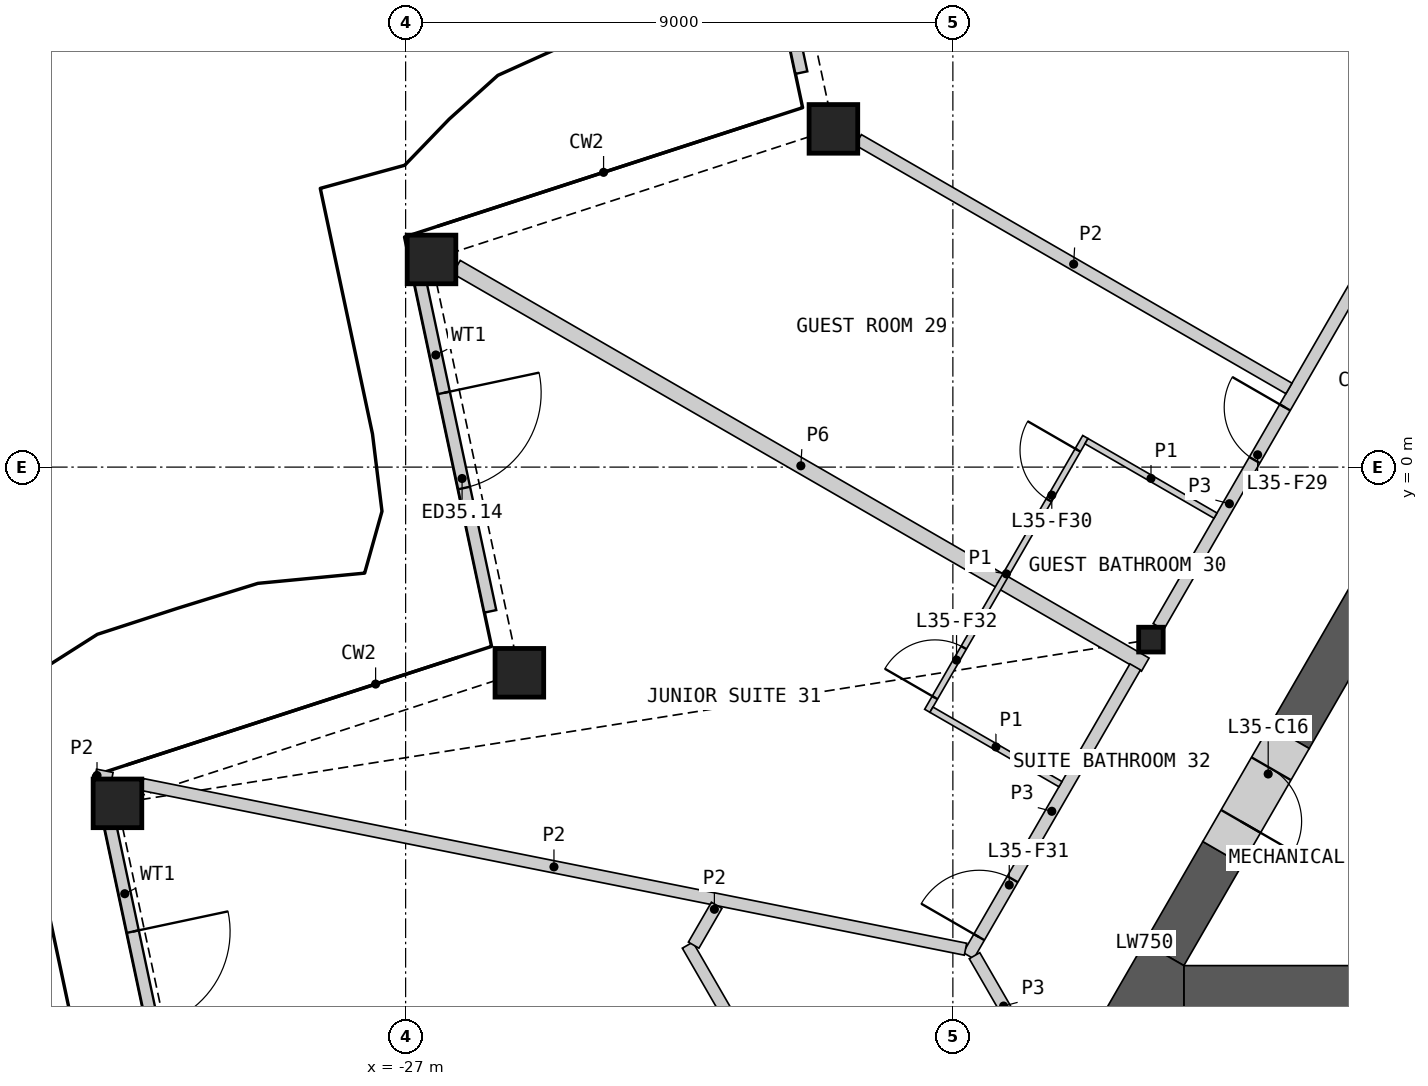
"""IFC4 building model, lengths in metres.
Left out: names, types, materials, properties, quantities, classifications, styles, units other than length and angle.
Written with IfcOpenShell. Run it as: python <this file> out.ifc"""

import sys

from ifc_helpers import new_model, si_unit, direction, frame, frame_2d, origin, origin_2d, place, context, subcontext, project, spatial, polyline, rectangle, hollow_rectangle, i_section, outline, extrude, element, fill, save


model = new_model("IFC4")
c1 = context("Model", 3, precision=1e-05, world=origin(), true_north=direction((0.0, 1.0)))
c2 = subcontext(c1, "Body", "Model", "MODEL_VIEW")
j1 = project(units=[si_unit("LENGTHUNIT", "METRE"), si_unit("PLANEANGLEUNIT", "RADIAN")], contexts=[c1])
p1 = place(None, origin())
s1 = spatial("IfcSite", under=j1, at=p1, CompositionType="ELEMENT")
p2 = place(p1, origin())
s2 = spatial("IfcBuilding", under=s1, at=p2, CompositionType="ELEMENT")
p3 = place(p2, frame((0.0, 0.0, 169.2)))
s3 = spatial("IfcBuildingStorey", under=s2, at=p3, CompositionType="ELEMENT", Elevation=169.2)
for number, where, z_axis, x_axis in (
    (1, (-19.965, 5.563, 0.0), (0.0, 0.0, 1.0), (1.0, 0.0, 0.0)),
    (2, (-26.574, 3.415, 0.0), (0.0, 0.0, 1.0), (1.0, 0.0, 0.0)),
    (3, (-25.129, -3.383, 0.0), (0.0, 0.0, 1.0), (1.0, 0.0, 0.0)),
    (4, (-31.739, -5.53, 0.0), (0.0, 0.0, 1.0), (1.0, 0.0, 0.0)),
):
    element("IfcColumn", number, at=place(p3, frame(where, z_axis=z_axis, x_axis=x_axis)), inside=s3, PredefinedType="COLUMN", context=c2, shape_type="SweptSolid", body=[
        extrude(hollow_rectangle(XDim=0.8, YDim=0.8, WallThickness=0.05, at=origin_2d()), origin(), (0.0, 0.0, 1.0), 3.6),
    ])
p4 = place(p3, frame((-14.743, -2.837, 0.0), z_axis=(0.0, 0.0, 1.0), x_axis=(1.0, 0.0, 0.0)))
e5 = element("IfcColumn", 5, at=p4, inside=s3, PredefinedType="COLUMN", context=c2, shape_type="SweptSolid", body=[
    extrude(i_section(OverallWidth=0.404, OverallDepth=0.407, WebThickness=0.027, FlangeThickness=0.044, at=origin_2d()), origin(), (0.0, 0.0, 1.0), 3.6),
])
p5 = place(p3, frame((-21.686, 12.111, 0.0), z_axis=(0.0, 0.0, 1.0), x_axis=(0.207872471739, -0.978155936184, 0.0)))
e6 = element("IfcWall", 6, at=p5, inside=s3, PredefinedType="SOLIDWALL", context=c2, shape_type="SweptSolid", body=[
    extrude(rectangle(XDim=5.748, YDim=0.2, at=frame_2d((2.874, 0.0))), origin(), (0.0, 0.0, 1.0), 2.701),
])
p6 = place(p5, frame((2.074, 0.0, 0.0)))
e7 = element("IfcOpeningElement", 7, at=p6, cuts=e6, PredefinedType="OPENING", context=c2, shape_type="SweptSolid", body=[
    extrude(rectangle(XDim=1.6, YDim=2.4, at=frame_2d((0.8, 1.2))), frame((0.0, 0.11, 0.0), z_axis=(0.0, -1.0, 0.0), x_axis=(1.0, 0.0, 0.0)), (0.0, 0.0, 1.0), 0.22),
])
p7 = place(p3, frame((-26.802, 3.25, 0.0), z_axis=(0.0, 0.0, 1.0), x_axis=(0.207921749173, -0.97814546271, 0.0)))
e8 = element("IfcWall", 8, at=p7, inside=s3, PredefinedType="SOLIDWALL", context=c2, shape_type="SweptSolid", body=[
    extrude(rectangle(XDim=5.748, YDim=0.2, at=frame_2d((2.874, 0.0))), origin(), (0.0, 0.0, 1.0), 2.701),
])
p8 = place(p7, frame((2.074, 0.0, 0.0)))
e9 = element("IfcOpeningElement", 9, at=p8, cuts=e8, PredefinedType="OPENING", context=c2, shape_type="SweptSolid", body=[
    extrude(rectangle(XDim=1.6, YDim=2.4, at=frame_2d((0.8, 1.2))), frame((0.0, 0.11, 0.0), z_axis=(0.0, -1.0, 0.0), x_axis=(1.0, 0.0, 0.0)), (0.0, 0.0, 1.0), 0.22),
])
p9 = place(p3, frame((-31.918, -5.611, 0.0), z_axis=(0.0, 0.0, 1.0), x_axis=(0.207913110781, -0.97814729891, 0.0)))
e10 = element("IfcWall", 10, at=p9, inside=s3, PredefinedType="SOLIDWALL", context=c2, shape_type="SweptSolid", body=[
    extrude(rectangle(XDim=5.748, YDim=0.2, at=frame_2d((2.874, 0.0))), origin(), (0.0, 0.0, 1.0), 2.701),
])
p10 = place(p9, frame((2.074, 0.0, 0.0)))
e11 = element("IfcOpeningElement", 11, at=p10, cuts=e10, PredefinedType="OPENING", context=c2, shape_type="SweptSolid", body=[
    extrude(rectangle(XDim=1.6, YDim=2.4, at=frame_2d((0.8, 1.2))), frame((0.0, 0.11, 0.0), z_axis=(0.0, -1.0, 0.0), x_axis=(1.0, 0.0, 0.0)), (0.0, 0.0, 1.0), 0.22),
])
p11 = place(p3, frame((-14.201, -8.574, 0.0), z_axis=(0.0, 0.0, 1.0), x_axis=(1.0, 0.0, 0.0)))
e12 = element("IfcWall", 12, at=p11, inside=s3, PredefinedType="SHEAR", context=c2, shape_type="SweptSolid", body=[
    extrude(rectangle(XDim=6.785, YDim=0.75, at=frame_2d((3.393, 0.0))), origin(), (0.0, 0.0, 1.0), 3.25),
])
p12 = place(p3, frame((-11.133, -2.135, 0.0), z_axis=(0.0, 0.0, 1.0), x_axis=(-0.499936812382, -0.866061882099, 0.0)))
e13 = element("IfcWall", 13, at=p12, inside=s3, PredefinedType="SHEAR", context=c2, shape_type="SweptSolid", body=[
    extrude(rectangle(XDim=2.662, YDim=0.75, at=frame_2d((1.331, 0.0))), origin(), (0.0, 0.0, 1.0), 3.25),
])
p13 = place(p3, frame((-13.564, -6.346, 0.0), z_axis=(0.0, 0.0, 1.0), x_axis=(-0.499989888488, -0.86603124159, 0.0)))
e14 = element("IfcWall", 14, at=p13, inside=s3, PredefinedType="SHEAR", context=c2, shape_type="SweptSolid", body=[
    extrude(rectangle(XDim=1.923, YDim=0.75, at=frame_2d((0.961, 0.0))), origin(), (0.0, 0.0, 1.0), 3.25),
])
p14 = place(p3, origin())
e15 = element("IfcWall", 15, at=p14, inside=s3, PredefinedType="SHEAR", context=c2, shape_type="SweptSolid", body=[
    extrude(outline(polyline([(-14.851, -7.824), (-14.201, -8.199), (-14.201, -8.949), (-15.5, -8.949), (-14.851, -7.824)])), origin(), (0.0, 0.0, 1.0), 3.25),
])
p15 = place(p3, frame((-12.464, -4.441, 0.0), z_axis=(0.0, 0.0, 1.0), x_axis=(-0.499994660107, -0.866028486751, 0.0)))
e16 = element("IfcWall", 16, at=p15, inside=s3, PredefinedType="SHEAR", context=c2, shape_type="SweptSolid", body=[
    extrude(rectangle(XDim=2.2, YDim=0.75, at=frame_2d((1.1, 0.0))), origin(), (0.0, 0.0, 1.0), 3.25),
])
p16 = place(p15, frame((0.6, 0.0, 0.0)))
e17 = element("IfcOpeningElement", 17, at=p16, cuts=e16, PredefinedType="OPENING", context=c2, shape_type="SweptSolid", body=[
    extrude(rectangle(XDim=1.0, YDim=2.1, at=frame_2d((0.5, 1.05))), frame((0.0, 0.385, 0.0), z_axis=(0.0, -1.0, 0.0), x_axis=(1.0, 0.0, 0.0)), (0.0, 0.0, 1.0), 0.77),
])
p17 = place(p3, frame((-26.164, 3.292, 0.0), z_axis=(0.0, 0.0, 1.0), x_axis=(0.866022412254, -0.500005181446, 0.0)))
e18 = element("IfcWall", 18, at=p17, inside=s3, PredefinedType="PARTITIONING", context=c2, shape_type="SweptSolid", body=[
    extrude(rectangle(XDim=13.081, YDim=0.25, at=frame_2d((6.541, 0.0))), origin(), (0.0, 0.0, 1.0), 2.404),
])
p18 = place(p3, frame((-14.619, -2.624, 0.0), z_axis=(0.0, 0.0, 1.0), x_axis=(0.50000393355, 0.866023132736, 0.0)))
e19 = element("IfcWall", 19, at=p18, inside=s3, PredefinedType="PARTITIONING", context=c2, shape_type="SweptSolid", body=[
    extrude(rectangle(XDim=9.335, YDim=0.2, at=frame_2d((4.667, 0.0))), origin(), (0.0, 0.0, 1.0), 3.25),
])
p19 = place(p18, frame((3.163, 0.0, 0.0)))
e20 = element("IfcOpeningElement", 20, at=p19, cuts=e19, PredefinedType="OPENING", context=c2, shape_type="SweptSolid", body=[
    extrude(rectangle(XDim=1.0, YDim=2.1, at=frame_2d((0.5, 1.05))), frame((0.0, 0.11, 0.0), z_axis=(0.0, -1.0, 0.0), x_axis=(1.0, 0.0, 0.0)), (0.0, 0.0, 1.0), 0.22),
])
p20 = place(p3, frame((-17.744, -8.035, 0.0), z_axis=(0.0, 0.0, 1.0), x_axis=(0.500007607708, 0.866021011428, 0.0)))
e21 = element("IfcWall", 21, at=p20, inside=s3, PredefinedType="PARTITIONING", context=c2, shape_type="SweptSolid", body=[
    extrude(rectangle(XDim=5.484, YDim=0.2, at=frame_2d((2.742, 0.0))), origin(), (0.0, 0.0, 1.0), 3.25),
])
p21 = place(p20, frame((0.352, 0.0, 0.0)))
e22 = element("IfcOpeningElement", 22, at=p21, cuts=e21, PredefinedType="OPENING", context=c2, shape_type="SweptSolid", body=[
    extrude(rectangle(XDim=1.1, YDim=2.1, at=frame_2d((0.55, 1.05))), frame((0.0, 0.11, 0.0), z_axis=(0.0, -1.0, 0.0), x_axis=(1.0, 0.0, 0.0)), (0.0, 0.0, 1.0), 0.22),
])
p22 = place(p3, frame((-17.644, -8.035, 0.0), z_axis=(0.0, 0.0, 1.0), x_axis=(0.499961815444, -0.866047448526, 0.0)))
e23 = element("IfcWall", 23, at=p22, inside=s3, PredefinedType="PARTITIONING", context=c2, shape_type="SweptSolid", body=[
    extrude(rectangle(XDim=3.826, YDim=0.2, at=frame_2d((1.913, 0.0))), origin(), (0.0, 0.0, 1.0), 3.25),
])
p23 = place(p22, frame((1.386, 0.0, 0.0)))
e24 = element("IfcOpeningElement", 24, at=p23, cuts=e23, PredefinedType="OPENING", context=c2, shape_type="SweptSolid", body=[
    extrude(rectangle(XDim=0.95, YDim=2.1, at=frame_2d((0.475, 1.05))), frame((0.0, 0.11, 0.0), z_axis=(0.0, -1.0, 0.0), x_axis=(1.0, 0.0, 0.0)), (0.0, 0.0, 1.0), 0.22),
])
p24 = place(p3, frame((-31.329, -5.221, 0.0), z_axis=(0.0, 0.0, 1.0), x_axis=(0.980565709097, -0.196190953266, 0.0)))
e25 = element("IfcWall", 25, at=p24, inside=s3, PredefinedType="PARTITIONING", context=c2, shape_type="SweptSolid", body=[
    extrude(rectangle(XDim=13.805, YDim=0.2, at=frame_2d((6.903, 0.0))), origin(), (0.0, 0.0, 1.0), 2.404),
])
p25 = place(p3, frame((-22.363, -7.862, 0.0), z_axis=(0.0, 0.0, 1.0), x_axis=(0.500009728207, -0.866019787128, 0.0)))
e26 = element("IfcWall", 26, at=p25, inside=s3, PredefinedType="PARTITIONING", context=c2, shape_type="SweptSolid", body=[
    extrude(rectangle(XDim=11.967, YDim=0.2, at=frame_2d((5.983, 0.0))), origin(), (0.0, 0.0, 1.0), 2.404),
])
p26 = place(p25, frame((5.658, 0.0, 0.0)))
e27 = element("IfcOpeningElement", 27, at=p26, cuts=e26, PredefinedType="OPENING", context=c2, shape_type="SweptSolid", body=[
    extrude(rectangle(XDim=0.95, YDim=2.1, at=frame_2d((0.475, 1.05))), frame((0.0, 0.11, 0.0), z_axis=(0.0, -1.0, 0.0), x_axis=(1.0, 0.0, 0.0)), (0.0, 0.0, 1.0), 0.22),
])
p27 = place(p3, frame((-19.555, 5.383, 0.0), z_axis=(0.0, 0.0, 1.0), x_axis=(0.866027979776, -0.499995538225, 0.0)))
e28 = element("IfcWall", 28, at=p27, inside=s3, PredefinedType="PARTITIONING", context=c2, shape_type="SweptSolid", body=[
    extrude(rectangle(XDim=8.177, YDim=0.2, at=frame_2d((4.089, 0.0))), origin(), (0.0, 0.0, 1.0), 2.404),
])
p28 = place(p3, frame((-22.263, -7.862, 0.0), z_axis=(0.0, 0.0, 1.0), x_axis=(0.499852814723, 0.866110364569, 0.0)))
e29 = element("IfcWall", 29, at=p28, inside=s3, PredefinedType="PARTITIONING", context=c2, shape_type="SweptSolid", body=[
    extrude(rectangle(XDim=0.757, YDim=0.2, at=frame_2d((0.378, 0.0))), origin(), (0.0, 0.0, 1.0), 2.404),
])
p29 = place(p3, frame((-32.103, -5.066, 0.0), z_axis=(0.0, 0.0, 1.0), x_axis=(0.980512850695, -0.19645495571, 0.0)))
e30 = element("IfcWall", 30, at=p29, inside=s3, PredefinedType="PARTITIONING", context=c2, shape_type="SweptSolid", body=[
    extrude(rectangle(XDim=0.277, YDim=0.2, at=frame_2d((0.139, 0.0))), origin(), (0.0, 0.0, 1.0), 2.404),
])
p30 = place(p3, frame((-18.421, -4.008, 0.0), z_axis=(0.0, 0.0, 1.0), x_axis=(0.500006934395, 0.866021400173, 0.0)))
e31 = element("IfcWall", 31, at=p30, inside=s3, PredefinedType="PARTITIONING", context=c2, shape_type="SweptSolid", body=[
    extrude(rectangle(XDim=5.2, YDim=0.1, at=frame_2d((2.6, 0.0))), origin(), (0.0, 0.0, 1.0), 2.404),
])
p31 = place(p30, frame((4.0, 0.0, 0.0)))
e32 = element("IfcOpeningElement", 32, at=p31, cuts=e31, PredefinedType="OPENING", context=c2, shape_type="SweptSolid", body=[
    extrude(rectangle(XDim=0.95, YDim=2.1, at=frame_2d((0.475, 1.05))), frame((0.0, 0.06, 0.0), z_axis=(0.0, -1.0, 0.0), x_axis=(1.0, 0.0, 0.0)), (0.0, 0.0, 1.0), 0.12),
])
p32 = place(p30, frame((0.25, 0.0, 0.0)))
e33 = element("IfcOpeningElement", 33, at=p32, cuts=e31, PredefinedType="OPENING", context=c2, shape_type="SweptSolid", body=[
    extrude(rectangle(XDim=0.95, YDim=2.1, at=frame_2d((0.475, 1.05))), frame((0.0, 0.06, 0.0), z_axis=(0.0, -1.0, 0.0), x_axis=(1.0, 0.0, 0.0)), (0.0, 0.0, 1.0), 0.12),
])
p33 = place(p3, frame((-18.353, -3.99, 0.0), z_axis=(0.0, 0.0, 1.0), x_axis=(0.866057815567, -0.499943856944, 0.0)))
e34 = element("IfcWall", 34, at=p33, inside=s3, PredefinedType="PARTITIONING", context=c2, shape_type="SweptSolid", body=[
    extrude(rectangle(XDim=2.45, YDim=0.1, at=frame_2d((1.225, 0.0))), origin(), (0.0, 0.0, 1.0), 2.404),
])
p34 = place(p3, frame((-15.802, 0.427, 0.0), z_axis=(0.0, 0.0, 1.0), x_axis=(0.866032905446, -0.499987006516, 0.0)))
e35 = element("IfcWall", 35, at=p34, inside=s3, PredefinedType="PARTITIONING", context=c2, shape_type="SweptSolid", body=[
    extrude(rectangle(XDim=2.45, YDim=0.1, at=frame_2d((1.225, 0.0))), origin(), (0.0, 0.0, 1.0), 2.404),
])
p35 = place(p8, origin())
e36 = element("IfcDoor", 36, at=p35, inside=s3, OperationType="DOUBLE_DOOR_SINGLE_SWING", PredefinedType="DOOR", context=c2, shape_type="SweptSolid", body=[
    extrude(rectangle(XDim=1.6, YDim=2.4, at=frame_2d((0.8, 1.2))), frame((0.0, 0.025, 0.0), z_axis=(0.0, -1.0, 0.0), x_axis=(1.0, 0.0, 0.0)), (0.0, 0.0, 1.0), 0.05),
])
fill(e9, e36)
p36 = place(p10, origin())
e37 = element("IfcDoor", 37, at=p36, inside=s3, OperationType="DOUBLE_DOOR_SINGLE_SWING", PredefinedType="DOOR", context=c2, shape_type="SweptSolid", body=[
    extrude(rectangle(XDim=1.6, YDim=2.4, at=frame_2d((0.8, 1.2))), frame((0.0, 0.025, 0.0), z_axis=(0.0, -1.0, 0.0), x_axis=(1.0, 0.0, 0.0)), (0.0, 0.0, 1.0), 0.05),
])
fill(e11, e37)
p37 = place(p16, origin())
e38 = element("IfcDoor", 38, at=p37, inside=s3, OperationType="SINGLE_SWING_RIGHT", PredefinedType="DOOR", context=c2, shape_type="SweptSolid", body=[
    extrude(rectangle(XDim=1.0, YDim=2.1, at=frame_2d((0.5, 1.05))), frame((0.0, 0.13, 0.0), z_axis=(0.0, -1.0, 0.0), x_axis=(1.0, 0.0, 0.0)), (0.0, 0.0, 1.0), 0.05),
])
fill(e17, e38)
p38 = place(p19, origin())
e39 = element("IfcDoor", 39, at=p38, inside=s3, OperationType="SINGLE_SWING_RIGHT", PredefinedType="DOOR", context=c2, shape_type="SweptSolid", body=[
    extrude(rectangle(XDim=1.0, YDim=2.1, at=frame_2d((0.5, 1.05))), frame((0.0, 0.025, 0.0), z_axis=(0.0, -1.0, 0.0), x_axis=(1.0, 0.0, 0.0)), (0.0, 0.0, 1.0), 0.05),
])
fill(e20, e39)
p39 = place(p31, origin())
e40 = element("IfcDoor", 40, at=p39, inside=s3, OperationType="SINGLE_SWING_RIGHT", PredefinedType="DOOR", context=c2, shape_type="SweptSolid", body=[
    extrude(rectangle(XDim=0.95, YDim=2.1, at=frame_2d((0.475, 1.05))), frame((0.0, 0.025, 0.0), z_axis=(0.0, -1.0, 0.0), x_axis=(1.0, 0.0, 0.0)), (0.0, 0.0, 1.0), 0.05),
])
fill(e32, e40)
p40 = place(p21, origin())
e41 = element("IfcDoor", 41, at=p40, inside=s3, OperationType="SINGLE_SWING_LEFT", PredefinedType="DOOR", context=c2, shape_type="SweptSolid", body=[
    extrude(rectangle(XDim=1.1, YDim=2.1, at=frame_2d((0.55, 1.05))), frame((0.0, 0.025, 0.0), z_axis=(0.0, -1.0, 0.0), x_axis=(1.0, 0.0, 0.0)), (0.0, 0.0, 1.0), 0.05),
])
fill(e22, e41)
p41 = place(p32, origin())
e42 = element("IfcDoor", 42, at=p41, inside=s3, OperationType="SINGLE_SWING_LEFT", PredefinedType="DOOR", context=c2, shape_type="SweptSolid", body=[
    extrude(rectangle(XDim=0.95, YDim=2.1, at=frame_2d((0.475, 1.05))), frame((0.0, 0.025, 0.0), z_axis=(0.0, -1.0, 0.0), x_axis=(1.0, 0.0, 0.0)), (0.0, 0.0, 1.0), 0.05),
])
fill(e33, e42)
save(model, sys.argv[1])
